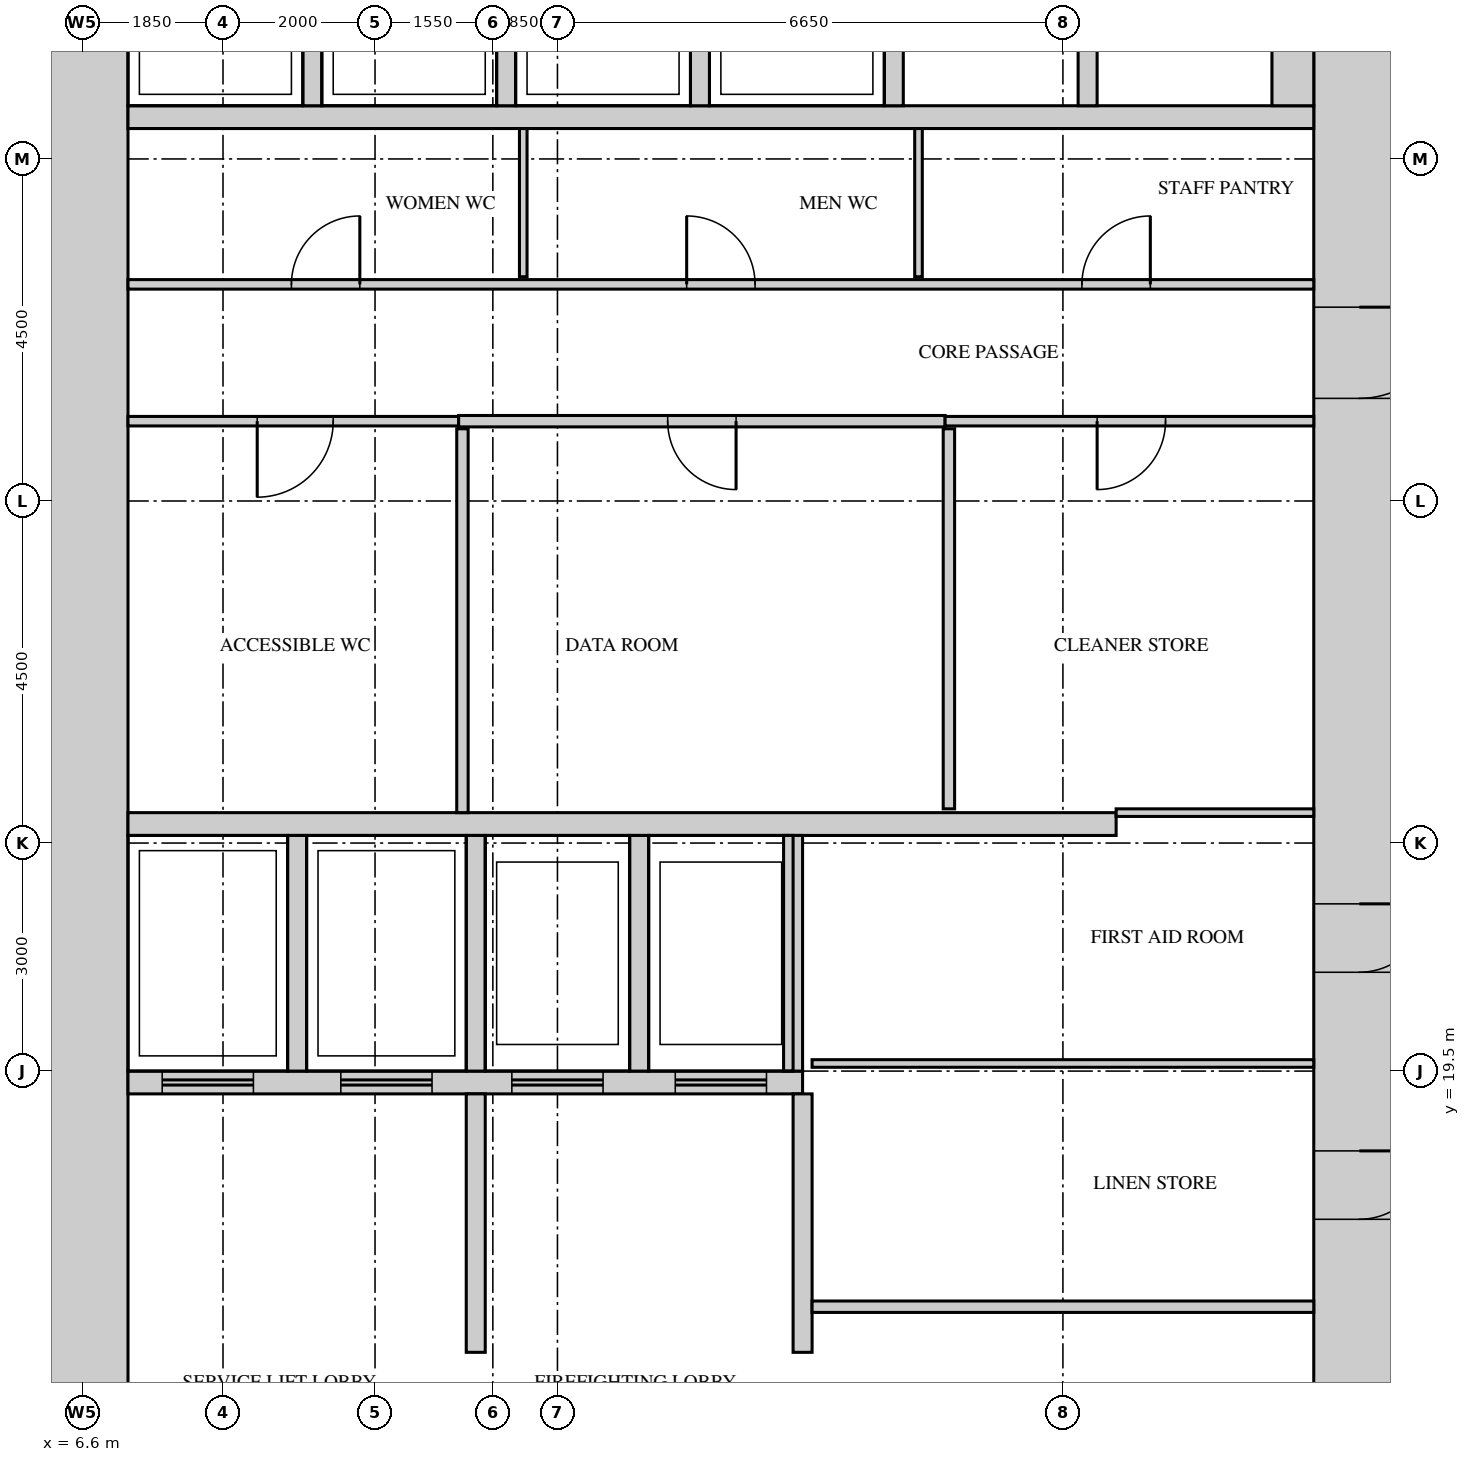
"""IFC4 building model, lengths in metres.
Left out: names, types, materials, properties, quantities, classifications, styles, units other than length and angle.
Written with IfcOpenShell. Run it as: python <this file> out.ifc"""

import sys

from ifc_helpers import new_model, si_unit, direction, frame, frame_2d, origin, place, context, subcontext, project, spatial, rectangle, extrude, source, transform, mapped, element, fill, save


model = new_model("IFC4")
c1 = context("Model", 3, precision=1e-05, world=origin(), true_north=direction((0.0, 1.0)))
c2 = subcontext(c1, "Body", "Model", "MODEL_VIEW")
j1 = project(units=[si_unit("LENGTHUNIT", "METRE"), si_unit("PLANEANGLEUNIT", "RADIAN")], contexts=[c1])
p1 = place(None, origin())
s1 = spatial("IfcSite", under=j1, at=p1, CompositionType="ELEMENT")
p2 = place(p1, origin())
s2 = spatial("IfcBuilding", under=s1, at=p2, CompositionType="ELEMENT")
p3 = place(p2, frame((0.0, 0.0, 55.5)))
s3 = spatial("IfcBuildingStorey", under=s2, at=p3, CompositionType="ELEMENT", Elevation=55.5)
m1 = source(origin(), c2, "Body", "SweptSolid", [
    extrude(rectangle(XDim=27.6, YDim=1.2, at=frame_2d((13.8, 0.0))), origin(), (0.0, 0.0, 1.0), 4.2),
])
p4 = place(p3, frame((23.4, 13.2, 0.0), z_axis=(0.0, 0.0, 1.0), x_axis=(0.0, 1.0, 0.0)))
e1 = element("IfcWall", 1, at=p4, inside=s3, PredefinedType="SHEAR", context=c2, shape_type="MappedRepresentation", body=[
    mapped(m1, transform((0.0, 0.0, 0.0))),
])
m2 = source(origin(), c2, "Body", "SweptSolid", [
    extrude(rectangle(XDim=1.8, YDim=2.1, at=frame_2d((0.9, 1.05))), frame((0.0, 0.61, 0.0), z_axis=(0.0, -1.0, 0.0), x_axis=(1.0, 0.0, 0.0)), (0.0, 0.0, 1.0), 1.22),
])
p5 = place(p4, frame((22.4, 0.0, 0.0)))
e2 = element("IfcOpeningElement", 2, at=p5, cuts=e1, PredefinedType="OPENING", context=c2, shape_type="MappedRepresentation", body=[
    mapped(m2, transform((0.0, 0.0, 0.0))),
])
m3 = source(origin(), c2, "Body", "SweptSolid", [
    extrude(rectangle(XDim=1.2, YDim=2.1, at=frame_2d((0.6, 1.05))), frame((0.0, 0.61, 0.0), z_axis=(0.0, -1.0, 0.0), x_axis=(1.0, 0.0, 0.0)), (0.0, 0.0, 1.0), 1.22),
])
p6 = place(p4, frame((15.15, 0.0, 0.0)))
e3 = element("IfcOpeningElement", 3, at=p6, cuts=e1, PredefinedType="OPENING", context=c2, shape_type="MappedRepresentation", body=[
    mapped(m3, transform((0.0, 0.0, 0.0))),
])
m4 = source(origin(), c2, "Body", "SweptSolid", [
    extrude(rectangle(XDim=0.9, YDim=2.1, at=frame_2d((0.45, 1.05))), frame((0.0, 0.61, 0.0), z_axis=(0.0, -1.0, 0.0), x_axis=(1.0, 0.0, 0.0)), (0.0, 0.0, 1.0), 1.22),
])
p7 = place(p4, frame((1.15, 0.0, 0.0)))
e4 = element("IfcOpeningElement", 4, at=p7, cuts=e1, PredefinedType="OPENING", context=c2, shape_type="MappedRepresentation", body=[
    mapped(m4, transform((0.0, 0.0, 0.0))),
])
p8 = place(p4, frame((4.35, 0.0, 0.0)))
e5 = element("IfcOpeningElement", 5, at=p8, cuts=e1, PredefinedType="OPENING", context=c2, shape_type="MappedRepresentation", body=[
    mapped(m4, transform((0.0, 0.0, 0.0))),
])
p9 = place(p4, frame((7.6, 0.0, 0.0)))
e6 = element("IfcOpeningElement", 6, at=p9, cuts=e1, PredefinedType="OPENING", context=c2, shape_type="MappedRepresentation", body=[
    mapped(m4, transform((0.0, 0.0, 0.0))),
])
p10 = place(p3, frame((6.6, 13.2, 0.0), z_axis=(0.0, 0.0, 1.0), x_axis=(0.0, 1.0, 0.0)))
e7 = element("IfcWall", 7, at=p10, inside=s3, PredefinedType="SHEAR", context=c2, shape_type="MappedRepresentation", body=[
    mapped(m1, transform((0.0, 0.0, 0.0))),
])
m5 = source(origin(), c2, "Body", "SweptSolid", [
    extrude(rectangle(XDim=13.0, YDim=0.3, at=frame_2d((6.5, 0.0))), origin(), (0.0, 0.0, 1.0), 4.2),
])
p11 = place(p3, frame((7.2, 22.75, 0.0), z_axis=(0.0, 0.0, 1.0), x_axis=(1.0, 0.0, 0.0)))
e8 = element("IfcWall", 8, at=p11, inside=s3, PredefinedType="STANDARD", context=c2, shape_type="MappedRepresentation", body=[
    mapped(m5, transform((0.0, 0.0, 0.0))),
])
m6 = source(origin(), c2, "Body", "SweptSolid", [
    extrude(rectangle(XDim=8.875, YDim=0.3, at=frame_2d((4.438, 0.0))), origin(), (0.0, 0.0, 1.0), 4.2),
])
p12 = place(p3, frame((7.2, 19.35, 0.0), z_axis=(0.0, 0.0, 1.0), x_axis=(1.0, 0.0, 0.0)))
e9 = element("IfcWall", 9, at=p12, inside=s3, PredefinedType="STANDARD", context=c2, shape_type="MappedRepresentation", body=[
    mapped(m6, transform((0.0, 0.0, 0.0))),
])
m7 = source(origin(), c2, "Body", "SweptSolid", [
    extrude(rectangle(XDim=1.2, YDim=2.1, at=frame_2d((0.6, 1.05))), frame((0.0, 0.16, 0.0), z_axis=(0.0, -1.0, 0.0), x_axis=(1.0, 0.0, 0.0)), (0.0, 0.0, 1.0), 0.32),
])
p13 = place(p12, frame((0.45, 0.0, 0.0)))
e10 = element("IfcOpeningElement", 10, at=p13, cuts=e9, PredefinedType="OPENING", context=c2, shape_type="MappedRepresentation", body=[
    mapped(m7, transform((0.0, 0.0, 0.0))),
])
p14 = place(p12, frame((2.8, 0.0, 0.0)))
e11 = element("IfcOpeningElement", 11, at=p14, cuts=e9, PredefinedType="OPENING", context=c2, shape_type="MappedRepresentation", body=[
    mapped(m7, transform((0.0, 0.0, 0.0))),
])
p15 = place(p12, frame((5.05, 0.0, 0.0)))
e12 = element("IfcOpeningElement", 12, at=p15, cuts=e9, PredefinedType="OPENING", context=c2, shape_type="MappedRepresentation", body=[
    mapped(m7, transform((0.0, 0.0, 0.0))),
])
p16 = place(p12, frame((7.2, 0.0, 0.0)))
e13 = element("IfcOpeningElement", 13, at=p16, cuts=e9, PredefinedType="OPENING", context=c2, shape_type="MappedRepresentation", body=[
    mapped(m7, transform((0.0, 0.0, 0.0))),
])
m8 = source(origin(), c2, "Body", "SweptSolid", [
    extrude(rectangle(XDim=15.6, YDim=0.3, at=frame_2d((7.8, 0.0))), origin(), (0.0, 0.0, 1.0), 4.2),
])
p17 = place(p3, frame((7.2, 32.05, 0.0), z_axis=(0.0, 0.0, 1.0), x_axis=(1.0, 0.0, 0.0)))
e14 = element("IfcWall", 14, at=p17, inside=s3, PredefinedType="STANDARD", context=c2, shape_type="MappedRepresentation", body=[
    mapped(m8, transform((0.0, 0.0, 0.0))),
])
m9 = source(origin(), c2, "Body", "SweptSolid", [
    extrude(rectangle(XDim=3.1, YDim=0.25, at=frame_2d((1.55, 0.0))), origin(), (0.0, 0.0, 1.0), 4.2),
])
for number, where, z_axis, x_axis in (
    (15, (9.425, 19.5, 0.0), (0.0, 0.0, 1.0), (0.0, 1.0, 0.0)),
    (16, (11.775, 19.5, 0.0), (0.0, 0.0, 1.0), (0.0, 1.0, 0.0)),
    (17, (13.925, 19.5, 0.0), (0.0, 0.0, 1.0), (0.0, 1.0, 0.0)),
    (18, (15.95, 19.5, 0.0), (0.0, 0.0, 1.0), (0.0, 1.0, 0.0)),
):
    element("IfcWall", number, at=place(p3, frame(where, z_axis=z_axis, x_axis=x_axis)), inside=s3, PredefinedType="STANDARD", context=c2, shape_type="MappedRepresentation", body=[
        mapped(m9, transform((0.0, 0.0, 0.0))),
    ])
m10 = source(origin(), c2, "Body", "SweptSolid", [
    extrude(rectangle(XDim=2.4, YDim=0.25, at=frame_2d((1.2, 0.0))), origin(), (0.0, 0.0, 1.0), 4.2),
])
for number, where, z_axis, x_axis in (
    (19, (9.625, 32.2, 0.0), (0.0, 0.0, 1.0), (0.0, 1.0, 0.0)),
    (20, (12.175, 32.2, 0.0), (0.0, 0.0, 1.0), (0.0, 1.0, 0.0)),
    (21, (14.725, 32.2, 0.0), (0.0, 0.0, 1.0), (0.0, 1.0, 0.0)),
    (22, (17.275, 32.2, 0.0), (0.0, 0.0, 1.0), (0.0, 1.0, 0.0)),
    (23, (19.825, 32.2, 0.0), (0.0, 0.0, 1.0), (0.0, 1.0, 0.0)),
):
    element("IfcWall", number, at=place(p3, frame(where, z_axis=z_axis, x_axis=x_axis)), inside=s3, PredefinedType="STANDARD", context=c2, shape_type="MappedRepresentation", body=[
        mapped(m10, transform((0.0, 0.0, 0.0))),
    ])
m11 = source(origin(), c2, "Body", "SweptSolid", [
    extrude(rectangle(XDim=2.4, YDim=0.55, at=frame_2d((1.2, 0.0))), origin(), (0.0, 0.0, 1.0), 4.2),
])
p18 = place(p3, frame((22.525, 32.2, 0.0), z_axis=(0.0, 0.0, 1.0), x_axis=(0.0, 1.0, 0.0)))
e24 = element("IfcWall", 24, at=p18, inside=s3, PredefinedType="STANDARD", context=c2, shape_type="MappedRepresentation", body=[
    mapped(m11, transform((0.0, 0.0, 0.0))),
])
m12 = source(origin(), c2, "Body", "SweptSolid", [
    extrude(rectangle(XDim=3.4, YDim=0.25, at=frame_2d((1.7, 0.0))), origin(), (0.0, 0.0, 1.0), 4.2),
])
for number, where, z_axis, x_axis in (
    (25, (16.075, 15.8, 0.0), (0.0, 0.0, 1.0), (0.0, 1.0, 0.0)),
    (26, (11.775, 15.8, 0.0), (0.0, 0.0, 1.0), (0.0, 1.0, 0.0)),
):
    element("IfcWall", number, at=place(p3, frame(where, z_axis=z_axis, x_axis=x_axis)), inside=s3, PredefinedType="STANDARD", context=c2, shape_type="MappedRepresentation", body=[
        mapped(m12, transform((0.0, 0.0, 0.0))),
    ])
m13 = source(origin(), c2, "Body", "SweptSolid", [
    extrude(rectangle(XDim=6.6, YDim=0.15, at=frame_2d((3.3, 0.0))), origin(), (0.0, 0.0, 1.0), 4.3),
])
p19 = place(p3, frame((16.2, 16.4, 0.0), z_axis=(0.0, 0.0, 1.0), x_axis=(1.0, 0.0, 0.0)))
e27 = element("IfcWall", 27, at=p19, inside=s3, PredefinedType="PARTITIONING", context=c2, shape_type="MappedRepresentation", body=[
    mapped(m13, transform((0.0, 0.0, 0.0))),
])
m14 = source(origin(), c2, "Body", "SweptSolid", [
    extrude(rectangle(XDim=6.6, YDim=0.1, at=frame_2d((3.3, 0.0))), origin(), (0.0, 0.0, 1.0), 4.3),
])
p20 = place(p3, frame((16.2, 19.6, 0.0), z_axis=(0.0, 0.0, 1.0), x_axis=(1.0, 0.0, 0.0)))
e28 = element("IfcWall", 28, at=p20, inside=s3, PredefinedType="PARTITIONING", context=c2, shape_type="MappedRepresentation", body=[
    mapped(m14, transform((0.0, 0.0, 0.0))),
])
m15 = source(origin(), c2, "Body", "SweptSolid", [
    extrude(rectangle(XDim=5.05, YDim=0.15, at=frame_2d((2.525, 0.0))), origin(), (0.0, 0.0, 1.0), 4.3),
])
p21 = place(p3, frame((11.6, 22.9, 0.0), z_axis=(0.0, 0.0, 1.0), x_axis=(0.0, 1.0, 0.0)))
e29 = element("IfcWall", 29, at=p21, inside=s3, PredefinedType="PARTITIONING", context=c2, shape_type="MappedRepresentation", body=[
    mapped(m15, transform((0.0, 0.0, 0.0))),
])
m16 = source(origin(), c2, "Body", "SweptSolid", [
    extrude(rectangle(XDim=2.6, YDim=0.1, at=frame_2d((1.3, 0.0))), origin(), (0.0, 0.0, 1.0), 4.3),
])
p22 = place(p3, frame((20.2, 22.9, 0.0), z_axis=(0.0, 0.0, 1.0), x_axis=(1.0, 0.0, 0.0)))
e30 = element("IfcWall", 30, at=p22, inside=s3, PredefinedType="PARTITIONING", context=c2, shape_type="MappedRepresentation", body=[
    mapped(m16, transform((0.0, 0.0, 0.0))),
])
m17 = source(origin(), c2, "Body", "SweptSolid", [
    extrude(rectangle(XDim=5.0, YDim=0.15, at=frame_2d((2.5, 0.0))), origin(), (0.0, 0.0, 1.0), 4.3),
])
p23 = place(p3, frame((18.0, 22.95, 0.0), z_axis=(0.0, 0.0, 1.0), x_axis=(0.0, 1.0, 0.0)))
e31 = element("IfcWall", 31, at=p23, inside=s3, PredefinedType="PARTITIONING", context=c2, shape_type="MappedRepresentation", body=[
    mapped(m17, transform((0.0, 0.0, 0.0))),
])
m18 = source(origin(), c2, "Body", "SweptSolid", [
    extrude(rectangle(XDim=4.35, YDim=0.125, at=frame_2d((2.175, 0.0))), origin(), (0.0, 0.0, 1.0), 4.3),
])
p24 = place(p3, frame((7.2, 28.05, 0.0), z_axis=(0.0, 0.0, 1.0), x_axis=(1.0, 0.0, 0.0)))
e32 = element("IfcWall", 32, at=p24, inside=s3, PredefinedType="PARTITIONING", context=c2, shape_type="MappedRepresentation", body=[
    mapped(m18, transform((0.0, 0.0, 0.0))),
])
m19 = source(origin(), c2, "Body", "SweptSolid", [
    extrude(rectangle(XDim=1.0, YDim=2.1, at=frame_2d((0.5, 1.05))), frame((0.0, 0.073, 0.0), z_axis=(0.0, -1.0, 0.0), x_axis=(1.0, 0.0, 0.0)), (0.0, 0.0, 1.0), 0.145),
])
p25 = place(p24, frame((1.7, 0.0, 0.0)))
e33 = element("IfcOpeningElement", 33, at=p25, cuts=e32, PredefinedType="OPENING", context=c2, shape_type="MappedRepresentation", body=[
    mapped(m19, transform((0.0, 0.0, 0.0))),
])
m20 = source(origin(), c2, "Body", "SweptSolid", [
    extrude(rectangle(XDim=6.4, YDim=0.15, at=frame_2d((3.2, 0.0))), origin(), (0.0, 0.0, 1.0), 4.3),
])
p26 = place(p3, frame((11.55, 28.05, 0.0), z_axis=(0.0, 0.0, 1.0), x_axis=(1.0, 0.0, 0.0)))
e34 = element("IfcWall", 34, at=p26, inside=s3, PredefinedType="PARTITIONING", context=c2, shape_type="MappedRepresentation", body=[
    mapped(m20, transform((0.0, 0.0, 0.0))),
])
m21 = source(origin(), c2, "Body", "SweptSolid", [
    extrude(rectangle(XDim=0.9, YDim=2.1, at=frame_2d((0.45, 1.05))), frame((0.0, 0.085, 0.0), z_axis=(0.0, -1.0, 0.0), x_axis=(1.0, 0.0, 0.0)), (0.0, 0.0, 1.0), 0.17),
])
p27 = place(p26, frame((2.75, 0.0, 0.0)))
e35 = element("IfcOpeningElement", 35, at=p27, cuts=e34, PredefinedType="OPENING", context=c2, shape_type="MappedRepresentation", body=[
    mapped(m21, transform((0.0, 0.0, 0.0))),
])
m22 = source(origin(), c2, "Body", "SweptSolid", [
    extrude(rectangle(XDim=4.85, YDim=0.125, at=frame_2d((2.425, 0.0))), origin(), (0.0, 0.0, 1.0), 4.3),
])
p28 = place(p3, frame((17.95, 28.05, 0.0), z_axis=(0.0, 0.0, 1.0), x_axis=(1.0, 0.0, 0.0)))
e36 = element("IfcWall", 36, at=p28, inside=s3, PredefinedType="PARTITIONING", context=c2, shape_type="MappedRepresentation", body=[
    mapped(m22, transform((0.0, 0.0, 0.0))),
])
m23 = source(origin(), c2, "Body", "SweptSolid", [
    extrude(rectangle(XDim=0.9, YDim=2.1, at=frame_2d((0.45, 1.05))), frame((0.0, 0.073, 0.0), z_axis=(0.0, -1.0, 0.0), x_axis=(1.0, 0.0, 0.0)), (0.0, 0.0, 1.0), 0.145),
])
p29 = place(p28, frame((2.0, 0.0, 0.0)))
e37 = element("IfcOpeningElement", 37, at=p29, cuts=e36, PredefinedType="OPENING", context=c2, shape_type="MappedRepresentation", body=[
    mapped(m23, transform((0.0, 0.0, 0.0))),
])
m24 = source(origin(), c2, "Body", "SweptSolid", [
    extrude(rectangle(XDim=15.6, YDim=0.125, at=frame_2d((7.8, 0.0))), origin(), (0.0, 0.0, 1.0), 4.3),
])
p30 = place(p3, frame((7.2, 29.85, 0.0), z_axis=(0.0, 0.0, 1.0), x_axis=(1.0, 0.0, 0.0)))
e38 = element("IfcWall", 38, at=p30, inside=s3, PredefinedType="PARTITIONING", context=c2, shape_type="MappedRepresentation", body=[
    mapped(m24, transform((0.0, 0.0, 0.0))),
])
p31 = place(p30, frame((2.15, 0.0, 0.0)))
e39 = element("IfcOpeningElement", 39, at=p31, cuts=e38, PredefinedType="OPENING", context=c2, shape_type="MappedRepresentation", body=[
    mapped(m23, transform((0.0, 0.0, 0.0))),
])
p32 = place(p30, frame((7.35, 0.0, 0.0)))
e40 = element("IfcOpeningElement", 40, at=p32, cuts=e38, PredefinedType="OPENING", context=c2, shape_type="MappedRepresentation", body=[
    mapped(m23, transform((0.0, 0.0, 0.0))),
])
p33 = place(p30, frame((12.55, 0.0, 0.0)))
e41 = element("IfcOpeningElement", 41, at=p33, cuts=e38, PredefinedType="OPENING", context=c2, shape_type="MappedRepresentation", body=[
    mapped(m23, transform((0.0, 0.0, 0.0))),
])
m25 = source(origin(), c2, "Body", "SweptSolid", [
    extrude(rectangle(XDim=1.95, YDim=0.1, at=frame_2d((0.975, 0.0))), origin(), (0.0, 0.0, 1.0), 4.3),
])
for number, where, z_axis, x_axis in (
    (42, (12.4, 29.95, 0.0), (0.0, 0.0, 1.0), (0.0, 1.0, 0.0)),
    (43, (17.6, 29.95, 0.0), (0.0, 0.0, 1.0), (0.0, 1.0, 0.0)),
):
    element("IfcWall", number, at=place(p3, frame(where, z_axis=z_axis, x_axis=x_axis)), inside=s3, PredefinedType="PARTITIONING", context=c2, shape_type="MappedRepresentation", body=[
        mapped(m25, transform((0.0, 0.0, 0.0))),
    ])
m26 = source(origin(), c2, "Body", "SweptSolid", [
    extrude(rectangle(XDim=1.2, YDim=2.1, at=frame_2d((0.6, 1.05))), frame((0.0, 0.55, 0.0), z_axis=(0.0, -1.0, 0.0), x_axis=(1.0, 0.0, 0.0)), (0.0, 0.0, 1.0), 1.1),
])
p34 = place(p6, origin())
e44 = element("IfcDoor", 44, at=p34, inside=s3, OperationType="SINGLE_SWING_RIGHT", PredefinedType="DOOR", context=c2, shape_type="MappedRepresentation", body=[
    mapped(m26, transform((0.0, 0.0, 0.0))),
])
fill(e3, e44)
m27 = source(origin(), c2, "Body", "SweptSolid", [
    extrude(rectangle(XDim=0.9, YDim=2.1, at=frame_2d((0.45, 1.05))), frame((0.0, 0.025, 0.0), z_axis=(0.0, -1.0, 0.0), x_axis=(1.0, 0.0, 0.0)), (0.0, 0.0, 1.0), 0.05),
])
p35 = place(p31, origin())
e45 = element("IfcDoor", 45, at=p35, inside=s3, OperationType="SINGLE_SWING_LEFT", PredefinedType="DOOR", context=c2, shape_type="MappedRepresentation", body=[
    mapped(m27, transform((0.0, 0.0, 0.0))),
])
fill(e39, e45)
p36 = place(p32, origin())
e46 = element("IfcDoor", 46, at=p36, inside=s3, OperationType="SINGLE_SWING_RIGHT", PredefinedType="DOOR", context=c2, shape_type="MappedRepresentation", body=[
    mapped(m27, transform((0.0, 0.0, 0.0))),
])
fill(e40, e46)
p37 = place(p33, origin())
e47 = element("IfcDoor", 47, at=p37, inside=s3, OperationType="SINGLE_SWING_LEFT", PredefinedType="DOOR", context=c2, shape_type="MappedRepresentation", body=[
    mapped(m27, transform((0.0, 0.0, 0.0))),
])
fill(e41, e47)
m28 = source(origin(), c2, "Body", "SweptSolid", [
    extrude(rectangle(XDim=1.0, YDim=2.1, at=frame_2d((0.5, 1.05))), frame((0.0, 0.025, 0.0), z_axis=(0.0, -1.0, 0.0), x_axis=(1.0, 0.0, 0.0)), (0.0, 0.0, 1.0), 0.05),
])
p38 = place(p25, origin())
e48 = element("IfcDoor", 48, at=p38, inside=s3, OperationType="SINGLE_SWING_LEFT", PredefinedType="DOOR", context=c2, shape_type="MappedRepresentation", body=[
    mapped(m28, transform((0.0, 0.0, 0.0))),
])
fill(e33, e48)
p39 = place(p27, origin())
e49 = element("IfcDoor", 49, at=p39, inside=s3, OperationType="SINGLE_SWING_RIGHT", PredefinedType="DOOR", context=c2, shape_type="MappedRepresentation", body=[
    mapped(m27, transform((0.0, 0.0, 0.0))),
])
fill(e35, e49)
p40 = place(p29, origin())
e50 = element("IfcDoor", 50, at=p40, inside=s3, OperationType="SINGLE_SWING_LEFT", PredefinedType="DOOR", context=c2, shape_type="MappedRepresentation", body=[
    mapped(m27, transform((0.0, 0.0, 0.0))),
])
fill(e37, e50)
m29 = source(origin(), c2, "Body", "SweptSolid", [
    extrude(rectangle(XDim=0.9, YDim=2.1, at=frame_2d((0.45, 1.05))), frame((0.0, 0.55, 0.0), z_axis=(0.0, -1.0, 0.0), x_axis=(1.0, 0.0, 0.0)), (0.0, 0.0, 1.0), 1.1),
])
p41 = place(p8, origin())
e51 = element("IfcDoor", 51, at=p41, inside=s3, OperationType="SINGLE_SWING_RIGHT", PredefinedType="DOOR", context=c2, shape_type="MappedRepresentation", body=[
    mapped(m29, transform((0.0, 0.0, 0.0))),
])
fill(e5, e51)
p42 = place(p9, origin())
e52 = element("IfcDoor", 52, at=p42, inside=s3, OperationType="SINGLE_SWING_RIGHT", PredefinedType="DOOR", context=c2, shape_type="MappedRepresentation", body=[
    mapped(m29, transform((0.0, 0.0, 0.0))),
])
fill(e6, e52)
m30 = source(origin(), c2, "Body", "SweptSolid", [
    extrude(rectangle(XDim=1.2, YDim=2.1, at=frame_2d((0.6, 1.05))), frame((0.0, 0.025, 0.0), z_axis=(0.0, -1.0, 0.0), x_axis=(1.0, 0.0, 0.0)), (0.0, 0.0, 1.0), 0.05),
])
p43 = place(p13, origin())
e53 = element("IfcDoor", 53, at=p43, inside=s3, OperationType="DOUBLE_DOOR_SLIDING", PredefinedType="DOOR", context=c2, shape_type="MappedRepresentation", body=[
    mapped(m30, transform((0.0, 0.0, 0.0))),
])
fill(e10, e53)
p44 = place(p14, origin())
e54 = element("IfcDoor", 54, at=p44, inside=s3, OperationType="DOUBLE_DOOR_SLIDING", PredefinedType="DOOR", context=c2, shape_type="MappedRepresentation", body=[
    mapped(m30, transform((0.0, 0.0, 0.0))),
])
fill(e11, e54)
p45 = place(p15, origin())
e55 = element("IfcDoor", 55, at=p45, inside=s3, OperationType="DOUBLE_DOOR_SLIDING", PredefinedType="DOOR", context=c2, shape_type="MappedRepresentation", body=[
    mapped(m30, transform((0.0, 0.0, 0.0))),
])
fill(e12, e55)
p46 = place(p16, origin())
e56 = element("IfcDoor", 56, at=p46, inside=s3, OperationType="DOUBLE_DOOR_SLIDING", PredefinedType="DOOR", context=c2, shape_type="MappedRepresentation", body=[
    mapped(m30, transform((0.0, 0.0, 0.0))),
])
fill(e13, e56)
save(model, sys.argv[1])
